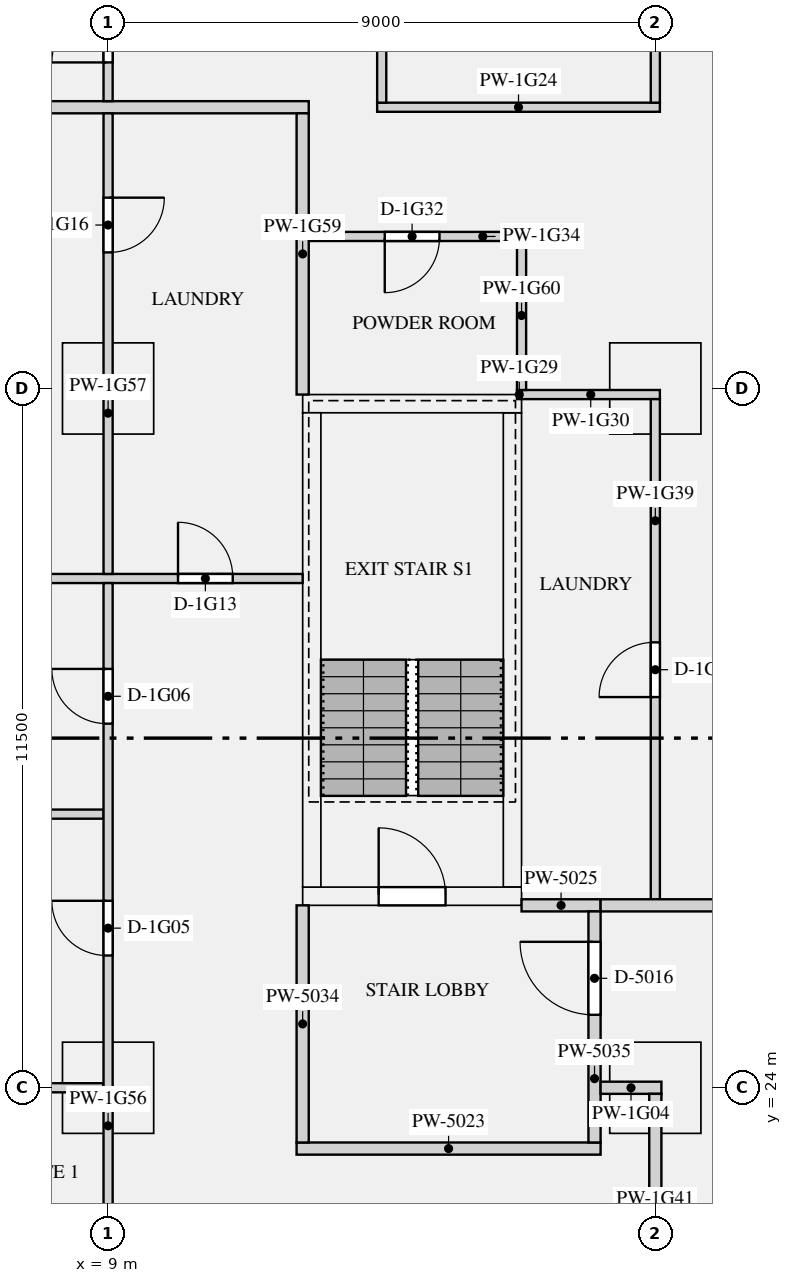
"""IFC4 building model, lengths in metres.
Left out: names, types, materials, properties, quantities, classifications, styles, units other than length and angle.
Written with IfcOpenShell. Run it as: python <this file> out.ifc"""

import sys

from ifc_helpers import new_model, si_unit, direction, frame, frame_2d, origin, origin_2d, place, context, subcontext, project, spatial, rectangle, extrude, element, fill, save


model = new_model("IFC4")
c1 = context("Model", 3, precision=1e-05, world=origin(), true_north=direction((0.0, 1.0)))
c2 = subcontext(c1, "Body", "Model", "MODEL_VIEW")
j1 = project(units=[si_unit("LENGTHUNIT", "METRE"), si_unit("PLANEANGLEUNIT", "RADIAN")], contexts=[c1])
p1 = place(None, origin())
s1 = spatial("IfcSite", under=j1, at=p1, CompositionType="ELEMENT")
p2 = place(p1, origin())
s2 = spatial("IfcBuilding", under=s1, at=p2, CompositionType="ELEMENT")
p3 = place(p2, frame((0.0, 0.0, 66.75)))
s3 = spatial("IfcBuildingStorey", under=s2, at=p3, CompositionType="ELEMENT", Elevation=66.75)
for number, where, z_axis, x_axis in (
    (1, (9.0, 24.0, 0.0), (0.0, 0.0, 1.0), (1.0, 0.0, 0.0)),
    (2, (18.0, 24.0, 0.0), (0.0, 0.0, 1.0), (1.0, 0.0, 0.0)),
    (3, (9.0, 35.5, 0.0), (0.0, 0.0, 1.0), (1.0, 0.0, 0.0)),
    (4, (18.0, 35.5, 0.0), (0.0, 0.0, 1.0), (1.0, 0.0, 0.0)),
):
    element("IfcColumn", number, at=place(p3, frame(where, z_axis=z_axis, x_axis=x_axis)), inside=s3, PredefinedType="COLUMN", context=c2, shape_type="SweptSolid", body=[
        extrude(rectangle(XDim=1.5, YDim=1.5, at=origin_2d()), origin(), (0.0, 0.0, 1.0), 3.15),
    ])
p4 = place(p3, frame((12.2, 27.15, 0.0), z_axis=(0.0, 0.0, 1.0), x_axis=(1.0, 0.0, 0.0)))
e5 = element("IfcWall", 5, at=p4, inside=s3, PredefinedType="SHEAR", context=c2, shape_type="SweptSolid", body=[
    extrude(rectangle(XDim=3.6, YDim=0.3, at=frame_2d((1.8, 0.0))), origin(), (0.0, 0.0, 1.0), 3.15),
])
p5 = place(p4, frame((1.25, 0.0, 0.0)))
e6 = element("IfcOpeningElement", 6, at=p5, cuts=e5, PredefinedType="OPENING", context=c2, shape_type="SweptSolid", body=[
    extrude(rectangle(XDim=1.1, YDim=2.1, at=frame_2d((0.55, 1.05))), frame((0.0, 0.16, 0.0), z_axis=(0.0, -1.0, 0.0), x_axis=(1.0, 0.0, 0.0)), (0.0, 0.0, 1.0), 0.32),
])
p6 = place(p3, frame((12.2, 35.25, 0.0), z_axis=(0.0, 0.0, 1.0), x_axis=(1.0, 0.0, 0.0)))
e7 = element("IfcWall", 7, at=p6, inside=s3, PredefinedType="SHEAR", context=c2, shape_type="SweptSolid", body=[
    extrude(rectangle(XDim=3.6, YDim=0.3, at=frame_2d((1.8, 0.0))), origin(), (0.0, 0.0, 1.0), 3.15),
])
for number, where, z_axis, x_axis in (
    (8, (12.35, 27.3, 0.0), (0.0, 0.0, 1.0), (0.0, 1.0, 0.0)),
    (9, (15.65, 27.3, 0.0), (0.0, 0.0, 1.0), (0.0, 1.0, 0.0)),
):
    element("IfcWall", number, at=place(p3, frame(where, z_axis=z_axis, x_axis=x_axis)), inside=s3, PredefinedType="SHEAR", context=c2, shape_type="SweptSolid", body=[
        extrude(rectangle(XDim=7.8, YDim=0.3, at=frame_2d((3.9, 0.0))), origin(), (0.0, 0.0, 1.0), 3.15),
    ])
p7 = place(p3, frame((12.1, 23.0, 0.0), z_axis=(0.0, 0.0, 1.0), x_axis=(1.0, 0.0, 0.0)))
e10 = element("IfcWall", 10, at=p7, inside=s3, PredefinedType="PARTITIONING", context=c2, shape_type="SweptSolid", body=[
    extrude(rectangle(XDim=5.0, YDim=0.2, at=frame_2d((2.5, 0.0))), origin(), (0.0, 0.0, 1.0), 2.83),
])
p8 = place(p3, frame((15.8, 27.0, 0.0), z_axis=(0.0, 0.0, 1.0), x_axis=(1.0, 0.0, 0.0)))
e11 = element("IfcWall", 11, at=p8, inside=s3, PredefinedType="PARTITIONING", context=c2, shape_type="SweptSolid", body=[
    extrude(rectangle(XDim=1.3, YDim=0.2, at=frame_2d((0.65, 0.0))), origin(), (0.0, 0.0, 1.0), 2.83),
])
p9 = place(p3, frame((12.2, 23.1, 0.0), z_axis=(0.0, 0.0, 1.0), x_axis=(0.0, 1.0, 0.0)))
e12 = element("IfcWall", 12, at=p9, inside=s3, PredefinedType="PARTITIONING", context=c2, shape_type="SweptSolid", body=[
    extrude(rectangle(XDim=3.9, YDim=0.2, at=frame_2d((1.95, 0.0))), origin(), (0.0, 0.0, 1.0), 2.83),
])
p10 = place(p3, frame((17.0, 23.1, 0.0), z_axis=(0.0, 0.0, 1.0), x_axis=(0.0, 1.0, 0.0)))
e13 = element("IfcWall", 13, at=p10, inside=s3, PredefinedType="PARTITIONING", context=c2, shape_type="SweptSolid", body=[
    extrude(rectangle(XDim=3.8, YDim=0.2, at=frame_2d((1.9, 0.0))), origin(), (0.0, 0.0, 1.0), 2.83),
])
p11 = place(p10, frame((2.1, 0.0, 0.0)))
e14 = element("IfcOpeningElement", 14, at=p11, cuts=e13, PredefinedType="OPENING", context=c2, shape_type="SweptSolid", body=[
    extrude(rectangle(XDim=1.2, YDim=2.1, at=frame_2d((0.6, 1.05))), frame((0.0, 0.11, 0.0), z_axis=(0.0, -1.0, 0.0), x_axis=(1.0, 0.0, 0.0)), (0.0, 0.0, 1.0), 0.22),
])
p12 = place(p3, frame((3.3, 24.0, 0.0), z_axis=(0.0, 0.0, 1.0), x_axis=(1.0, 0.0, 0.0)))
e15 = element("IfcWall", 15, at=p12, inside=s3, PredefinedType="PARTITIONING", context=c2, shape_type="SweptSolid", body=[
    extrude(rectangle(XDim=5.625, YDim=0.15, at=frame_2d((2.812, 0.0))), origin(), (0.0, 0.0, 1.0), 2.83),
])
p13 = place(p12, frame((2.675, 0.0, 0.0)))
e16 = element("IfcOpeningElement", 16, at=p13, cuts=e15, PredefinedType="OPENING", context=c2, shape_type="SweptSolid", body=[
    extrude(rectangle(XDim=0.8, YDim=2.1, at=frame_2d((0.4, 1.05))), frame((0.0, 0.085, 0.0), z_axis=(0.0, -1.0, 0.0), x_axis=(1.0, 0.0, 0.0)), (0.0, 0.0, 1.0), 0.17),
])
p14 = place(p3, frame((17.1, 24.0, 0.0), z_axis=(0.0, 0.0, 1.0), x_axis=(1.0, 0.0, 0.0)))
e17 = element("IfcWall", 17, at=p14, inside=s3, PredefinedType="PARTITIONING", context=c2, shape_type="SweptSolid", body=[
    extrude(rectangle(XDim=1.0, YDim=0.2, at=frame_2d((0.5, 0.0))), origin(), (0.0, 0.0, 1.0), 2.83),
])
p15 = place(p3, frame((17.1, 27.0, 0.0), z_axis=(0.0, 0.0, 1.0), x_axis=(1.0, 0.0, 0.0)))
e18 = element("IfcWall", 18, at=p15, inside=s3, PredefinedType="PARTITIONING", context=c2, shape_type="SweptSolid", body=[
    extrude(rectangle(XDim=7.0, YDim=0.2, at=frame_2d((3.5, 0.0))), origin(), (0.0, 0.0, 1.0), 2.83),
])
p16 = place(p3, frame((0.8, 32.375, 0.0), z_axis=(0.0, 0.0, 1.0), x_axis=(1.0, 0.0, 0.0)))
e19 = element("IfcWall", 19, at=p16, inside=s3, PredefinedType="PARTITIONING", context=c2, shape_type="SweptSolid", body=[
    extrude(rectangle(XDim=11.4, YDim=0.15, at=frame_2d((5.7, 0.0))), origin(), (0.0, 0.0, 1.0), 2.83),
])
p17 = place(p16, frame((9.35, 0.0, 0.0)))
e20 = element("IfcOpeningElement", 20, at=p17, cuts=e19, PredefinedType="OPENING", context=c2, shape_type="SweptSolid", body=[
    extrude(rectangle(XDim=0.9, YDim=2.1, at=frame_2d((0.45, 1.05))), frame((0.0, 0.085, 0.0), z_axis=(0.0, -1.0, 0.0), x_axis=(1.0, 0.0, 0.0)), (0.0, 0.0, 1.0), 0.17),
])
p18 = place(p3, frame((3.3, 28.5, 0.0), z_axis=(0.0, 0.0, 1.0), x_axis=(1.0, 0.0, 0.0)))
e21 = element("IfcWall", 21, at=p18, inside=s3, PredefinedType="PARTITIONING", context=c2, shape_type="SweptSolid", body=[
    extrude(rectangle(XDim=5.625, YDim=0.15, at=frame_2d((2.812, 0.0))), origin(), (0.0, 0.0, 1.0), 2.83),
])
p19 = place(p3, frame((13.425, 40.125, 0.0), z_axis=(0.0, 0.0, 1.0), x_axis=(1.0, 0.0, 0.0)))
e22 = element("IfcWall", 22, at=p19, inside=s3, PredefinedType="PARTITIONING", context=c2, shape_type="SweptSolid", body=[
    extrude(rectangle(XDim=4.65, YDim=0.15, at=frame_2d((2.325, 0.0))), origin(), (0.0, 0.0, 1.0), 2.83),
])
p20 = place(p3, frame((0.8, 40.125, 0.0), z_axis=(0.0, 0.0, 1.0), x_axis=(1.0, 0.0, 0.0)))
e23 = element("IfcWall", 23, at=p20, inside=s3, PredefinedType="PARTITIONING", context=c2, shape_type="SweptSolid", body=[
    extrude(rectangle(XDim=11.5, YDim=0.2, at=frame_2d((5.75, 0.0))), origin(), (0.0, 0.0, 1.0), 2.83),
])
p21 = place(p3, frame((15.725, 35.4, 0.0), z_axis=(0.0, 0.0, 1.0), x_axis=(1.0, 0.0, 0.0)))
e24 = element("IfcWall", 24, at=p21, inside=s3, PredefinedType="PARTITIONING", context=c2, shape_type="SweptSolid", body=[
    extrude(rectangle(XDim=0.075, YDim=0.15, at=frame_2d((0.038, 0.0))), origin(), (0.0, 0.0, 1.0), 2.83),
])
p22 = place(p3, frame((15.8, 35.4, 0.0), z_axis=(0.0, 0.0, 1.0), x_axis=(1.0, 0.0, 0.0)))
e25 = element("IfcWall", 25, at=p22, inside=s3, PredefinedType="PARTITIONING", context=c2, shape_type="SweptSolid", body=[
    extrude(rectangle(XDim=2.275, YDim=0.15, at=frame_2d((1.137, 0.0))), origin(), (0.0, 0.0, 1.0), 2.83),
])
p23 = place(p3, frame((12.3, 38.0, 0.0), z_axis=(0.0, 0.0, 1.0), x_axis=(1.0, 0.0, 0.0)))
e26 = element("IfcWall", 26, at=p23, inside=s3, PredefinedType="PARTITIONING", context=c2, shape_type="SweptSolid", body=[
    extrude(rectangle(XDim=3.575, YDim=0.15, at=frame_2d((1.788, 0.0))), origin(), (0.0, 0.0, 1.0), 2.83),
])
p24 = place(p23, frame((1.25, 0.0, 0.0)))
e27 = element("IfcOpeningElement", 27, at=p24, cuts=e26, PredefinedType="OPENING", context=c2, shape_type="SweptSolid", body=[
    extrude(rectangle(XDim=0.9, YDim=2.1, at=frame_2d((0.45, 1.05))), frame((0.0, 0.085, 0.0), z_axis=(0.0, -1.0, 0.0), x_axis=(1.0, 0.0, 0.0)), (0.0, 0.0, 1.0), 0.17),
])
p25 = place(p3, frame((18.0, 27.1, 0.0), z_axis=(0.0, 0.0, 1.0), x_axis=(0.0, 1.0, 0.0)))
e28 = element("IfcWall", 28, at=p25, inside=s3, PredefinedType="PARTITIONING", context=c2, shape_type="SweptSolid", body=[
    extrude(rectangle(XDim=8.225, YDim=0.15, at=frame_2d((4.112, 0.0))), origin(), (0.0, 0.0, 1.0), 2.83),
])
p26 = place(p25, frame((3.325, 0.0, 0.0)))
e29 = element("IfcOpeningElement", 29, at=p26, cuts=e28, PredefinedType="OPENING", context=c2, shape_type="SweptSolid", body=[
    extrude(rectangle(XDim=0.9, YDim=2.1, at=frame_2d((0.45, 1.05))), frame((0.0, 0.085, 0.0), z_axis=(0.0, -1.0, 0.0), x_axis=(1.0, 0.0, 0.0)), (0.0, 0.0, 1.0), 0.17),
])
p27 = place(p3, frame((18.0, 40.2, 0.0), z_axis=(0.0, 0.0, 1.0), x_axis=(0.0, 1.0, 0.0)))
e30 = element("IfcWall", 30, at=p27, inside=s3, PredefinedType="PARTITIONING", context=c2, shape_type="SweptSolid", body=[
    extrude(rectangle(XDim=7.5, YDim=0.15, at=frame_2d((3.75, 0.0))), origin(), (0.0, 0.0, 1.0), 2.83),
])
p28 = place(p27, frame((0.912, 0.0, 0.0)))
e31 = element("IfcOpeningElement", 31, at=p28, cuts=e30, PredefinedType="OPENING", context=c2, shape_type="SweptSolid", body=[
    extrude(rectangle(XDim=0.9, YDim=2.1, at=frame_2d((0.45, 1.05))), frame((0.0, 0.085, 0.0), z_axis=(0.0, -1.0, 0.0), x_axis=(1.0, 0.0, 0.0)), (0.0, 0.0, 1.0), 0.17),
])
p29 = place(p3, frame((18.0, 16.1, 0.0), z_axis=(0.0, 0.0, 1.0), x_axis=(0.0, 1.0, 0.0)))
e32 = element("IfcWall", 32, at=p29, inside=s3, PredefinedType="PARTITIONING", context=c2, shape_type="SweptSolid", body=[
    extrude(rectangle(XDim=7.8, YDim=0.2, at=frame_2d((3.9, 0.0))), origin(), (0.0, 0.0, 1.0), 2.83),
])
p30 = place(p29, frame((2.35, 0.0, 0.0)))
e33 = element("IfcOpeningElement", 33, at=p30, cuts=e32, PredefinedType="OPENING", context=c2, shape_type="SweptSolid", body=[
    extrude(rectangle(XDim=1.1, YDim=2.1, at=frame_2d((0.55, 1.05))), frame((0.0, 0.11, 0.0), z_axis=(0.0, -1.0, 0.0), x_axis=(1.0, 0.0, 0.0)), (0.0, 0.0, 1.0), 0.22),
])
p31 = place(p3, frame((13.5, 40.2, 0.0), z_axis=(0.0, 0.0, 1.0), x_axis=(0.0, 1.0, 0.0)))
e34 = element("IfcWall", 34, at=p31, inside=s3, PredefinedType="PARTITIONING", context=c2, shape_type="SweptSolid", body=[
    extrude(rectangle(XDim=7.5, YDim=0.15, at=frame_2d((3.75, 0.0))), origin(), (0.0, 0.0, 1.0), 2.83),
])
p32 = place(p31, frame((6.075, 0.0, 0.0)))
e35 = element("IfcOpeningElement", 35, at=p32, cuts=e34, PredefinedType="OPENING", context=c2, shape_type="SweptSolid", body=[
    extrude(rectangle(XDim=0.8, YDim=2.1, at=frame_2d((0.4, 1.05))), frame((0.0, 0.085, 0.0), z_axis=(0.0, -1.0, 0.0), x_axis=(1.0, 0.0, 0.0)), (0.0, 0.0, 1.0), 0.17),
])
p33 = place(p31, frame((3.4, 0.0, 0.0)))
e36 = element("IfcOpeningElement", 36, at=p33, cuts=e34, PredefinedType="OPENING", context=c2, shape_type="SweptSolid", body=[
    extrude(rectangle(XDim=0.8, YDim=2.1, at=frame_2d((0.4, 1.05))), frame((0.0, 0.085, 0.0), z_axis=(0.0, -1.0, 0.0), x_axis=(1.0, 0.0, 0.0)), (0.0, 0.0, 1.0), 0.17),
])
p34 = place(p3, frame((9.0, 20.575, 0.0), z_axis=(0.0, 0.0, 1.0), x_axis=(0.0, 1.0, 0.0)))
e37 = element("IfcWall", 37, at=p34, inside=s3, PredefinedType="PARTITIONING", context=c2, shape_type="SweptSolid", body=[
    extrude(rectangle(XDim=11.725, YDim=0.15, at=frame_2d((5.863, 0.0))), origin(), (0.0, 0.0, 1.0), 2.83),
])
p35 = place(p34, frame((5.6, 0.0, 0.0)))
e38 = element("IfcOpeningElement", 38, at=p35, cuts=e37, PredefinedType="OPENING", context=c2, shape_type="SweptSolid", body=[
    extrude(rectangle(XDim=0.9, YDim=2.1, at=frame_2d((0.45, 1.05))), frame((0.0, 0.085, 0.0), z_axis=(0.0, -1.0, 0.0), x_axis=(1.0, 0.0, 0.0)), (0.0, 0.0, 1.0), 0.17),
])
p36 = place(p34, frame((9.413, 0.0, 0.0)))
e39 = element("IfcOpeningElement", 39, at=p36, cuts=e37, PredefinedType="OPENING", context=c2, shape_type="SweptSolid", body=[
    extrude(rectangle(XDim=0.9, YDim=2.1, at=frame_2d((0.45, 1.05))), frame((0.0, 0.085, 0.0), z_axis=(0.0, -1.0, 0.0), x_axis=(1.0, 0.0, 0.0)), (0.0, 0.0, 1.0), 0.17),
])
p37 = place(p3, frame((9.0, 32.45, 0.0), z_axis=(0.0, 0.0, 1.0), x_axis=(0.0, 1.0, 0.0)))
e40 = element("IfcWall", 40, at=p37, inside=s3, PredefinedType="PARTITIONING", context=c2, shape_type="SweptSolid", body=[
    extrude(rectangle(XDim=7.575, YDim=0.15, at=frame_2d((3.788, 0.0))), origin(), (0.0, 0.0, 1.0), 2.83),
])
p38 = place(p37, frame((5.288, 0.0, 0.0)))
e41 = element("IfcOpeningElement", 41, at=p38, cuts=e40, PredefinedType="OPENING", context=c2, shape_type="SweptSolid", body=[
    extrude(rectangle(XDim=0.9, YDim=2.1, at=frame_2d((0.45, 1.05))), frame((0.0, 0.085, 0.0), z_axis=(0.0, -1.0, 0.0), x_axis=(1.0, 0.0, 0.0)), (0.0, 0.0, 1.0), 0.17),
])
p39 = place(p3, frame((9.0, 40.225, 0.0), z_axis=(0.0, 0.0, 1.0), x_axis=(0.0, 1.0, 0.0)))
e42 = element("IfcWall", 42, at=p39, inside=s3, PredefinedType="PARTITIONING", context=c2, shape_type="SweptSolid", body=[
    extrude(rectangle(XDim=7.475, YDim=0.15, at=frame_2d((3.737, 0.0))), origin(), (0.0, 0.0, 1.0), 2.83),
])
p40 = place(p39, frame((6.05, 0.0, 0.0)))
e43 = element("IfcOpeningElement", 43, at=p40, cuts=e42, PredefinedType="OPENING", context=c2, shape_type="SweptSolid", body=[
    extrude(rectangle(XDim=0.8, YDim=2.1, at=frame_2d((0.4, 1.05))), frame((0.0, 0.085, 0.0), z_axis=(0.0, -1.0, 0.0), x_axis=(1.0, 0.0, 0.0)), (0.0, 0.0, 1.0), 0.17),
])
p41 = place(p39, frame((3.375, 0.0, 0.0)))
e44 = element("IfcOpeningElement", 44, at=p41, cuts=e42, PredefinedType="OPENING", context=c2, shape_type="SweptSolid", body=[
    extrude(rectangle(XDim=0.8, YDim=2.1, at=frame_2d((0.4, 1.05))), frame((0.0, 0.085, 0.0), z_axis=(0.0, -1.0, 0.0), x_axis=(1.0, 0.0, 0.0)), (0.0, 0.0, 1.0), 0.17),
])
p42 = place(p39, frame((0.637, 0.0, 0.0)))
e45 = element("IfcOpeningElement", 45, at=p42, cuts=e42, PredefinedType="OPENING", context=c2, shape_type="SweptSolid", body=[
    extrude(rectangle(XDim=0.9, YDim=2.1, at=frame_2d((0.45, 1.05))), frame((0.0, 0.085, 0.0), z_axis=(0.0, -1.0, 0.0), x_axis=(1.0, 0.0, 0.0)), (0.0, 0.0, 1.0), 0.17),
])
p43 = place(p3, frame((12.2, 35.4, 0.0), z_axis=(0.0, 0.0, 1.0), x_axis=(0.0, 1.0, 0.0)))
e46 = element("IfcWall", 46, at=p43, inside=s3, PredefinedType="PARTITIONING", context=c2, shape_type="SweptSolid", body=[
    extrude(rectangle(XDim=4.625, YDim=0.2, at=frame_2d((2.312, 0.0))), origin(), (0.0, 0.0, 1.0), 2.83),
])
p44 = place(p3, frame((15.8, 35.475, 0.0), z_axis=(0.0, 0.0, 1.0), x_axis=(0.0, 1.0, 0.0)))
e47 = element("IfcWall", 47, at=p44, inside=s3, PredefinedType="PARTITIONING", context=c2, shape_type="SweptSolid", body=[
    extrude(rectangle(XDim=2.45, YDim=0.15, at=frame_2d((1.225, 0.0))), origin(), (0.0, 0.0, 1.0), 2.83),
])
p45 = place(p5, origin())
e48 = element("IfcDoor", 48, at=p45, inside=s3, OperationType="SINGLE_SWING_LEFT", PredefinedType="DOOR", context=c2, shape_type="SweptSolid", body=[
    extrude(rectangle(XDim=1.1, YDim=2.1, at=frame_2d((0.55, 1.05))), frame((0.0, 0.025, 0.0), z_axis=(0.0, -1.0, 0.0), x_axis=(1.0, 0.0, 0.0)), (0.0, 0.0, 1.0), 0.05),
])
fill(e6, e48)
p46 = place(p11, origin())
e49 = element("IfcDoor", 49, at=p46, inside=s3, OperationType="SINGLE_SWING_RIGHT", PredefinedType="DOOR", context=c2, shape_type="SweptSolid", body=[
    extrude(rectangle(XDim=1.2, YDim=2.1, at=frame_2d((0.6, 1.05))), frame((0.0, 0.025, 0.0), z_axis=(0.0, -1.0, 0.0), x_axis=(1.0, 0.0, 0.0)), (0.0, 0.0, 1.0), 0.05),
])
fill(e14, e49)
p47 = place(p35, origin())
e50 = element("IfcDoor", 50, at=p47, inside=s3, OperationType="SINGLE_SWING_RIGHT", PredefinedType="DOOR", context=c2, shape_type="SweptSolid", body=[
    extrude(rectangle(XDim=0.9, YDim=2.1, at=frame_2d((0.45, 1.05))), frame((0.0, 0.025, 0.0), z_axis=(0.0, -1.0, 0.0), x_axis=(1.0, 0.0, 0.0)), (0.0, 0.0, 1.0), 0.05),
])
fill(e38, e50)
p48 = place(p36, origin())
e51 = element("IfcDoor", 51, at=p48, inside=s3, OperationType="SINGLE_SWING_RIGHT", PredefinedType="DOOR", context=c2, shape_type="SweptSolid", body=[
    extrude(rectangle(XDim=0.9, YDim=2.1, at=frame_2d((0.45, 1.05))), frame((0.0, 0.025, 0.0), z_axis=(0.0, -1.0, 0.0), x_axis=(1.0, 0.0, 0.0)), (0.0, 0.0, 1.0), 0.05),
])
fill(e39, e51)
p49 = place(p17, origin())
e52 = element("IfcDoor", 52, at=p49, inside=s3, OperationType="SINGLE_SWING_LEFT", PredefinedType="DOOR", context=c2, shape_type="SweptSolid", body=[
    extrude(rectangle(XDim=0.9, YDim=2.1, at=frame_2d((0.45, 1.05))), frame((0.0, 0.025, 0.0), z_axis=(0.0, -1.0, 0.0), x_axis=(1.0, 0.0, 0.0)), (0.0, 0.0, 1.0), 0.05),
])
fill(e20, e52)
p50 = place(p38, frame((0.9, 0.0, 0.0), z_axis=(0.0, 0.0, 1.0), x_axis=(-1.0, 0.0, 0.0)))
e53 = element("IfcDoor", 53, at=p50, inside=s3, OperationType="SINGLE_SWING_LEFT", PredefinedType="DOOR", context=c2, shape_type="SweptSolid", body=[
    extrude(rectangle(XDim=0.9, YDim=2.1, at=frame_2d((0.45, 1.05))), frame((0.0, 0.025, 0.0), z_axis=(0.0, -1.0, 0.0), x_axis=(1.0, 0.0, 0.0)), (0.0, 0.0, 1.0), 0.05),
])
fill(e41, e53)
p51 = place(p26, origin())
e54 = element("IfcDoor", 54, at=p51, inside=s3, OperationType="SINGLE_SWING_LEFT", PredefinedType="DOOR", context=c2, shape_type="SweptSolid", body=[
    extrude(rectangle(XDim=0.9, YDim=2.1, at=frame_2d((0.45, 1.05))), frame((0.0, 0.025, 0.0), z_axis=(0.0, -1.0, 0.0), x_axis=(1.0, 0.0, 0.0)), (0.0, 0.0, 1.0), 0.05),
])
fill(e29, e54)
p52 = place(p42, origin())
e55 = element("IfcDoor", 55, at=p52, inside=s3, OperationType="SINGLE_SWING_LEFT", PredefinedType="DOOR", context=c2, shape_type="SweptSolid", body=[
    extrude(rectangle(XDim=0.9, YDim=2.1, at=frame_2d((0.45, 1.05))), frame((0.0, 0.025, 0.0), z_axis=(0.0, -1.0, 0.0), x_axis=(1.0, 0.0, 0.0)), (0.0, 0.0, 1.0), 0.05),
])
fill(e45, e55)
p53 = place(p24, frame((0.9, 0.0, 0.0), z_axis=(0.0, 0.0, 1.0), x_axis=(-1.0, 0.0, 0.0)))
e56 = element("IfcDoor", 56, at=p53, inside=s3, OperationType="SINGLE_SWING_RIGHT", PredefinedType="DOOR", context=c2, shape_type="SweptSolid", body=[
    extrude(rectangle(XDim=0.9, YDim=2.1, at=frame_2d((0.45, 1.05))), frame((0.0, 0.025, 0.0), z_axis=(0.0, -1.0, 0.0), x_axis=(1.0, 0.0, 0.0)), (0.0, 0.0, 1.0), 0.05),
])
fill(e27, e56)
save(model, sys.argv[1])
